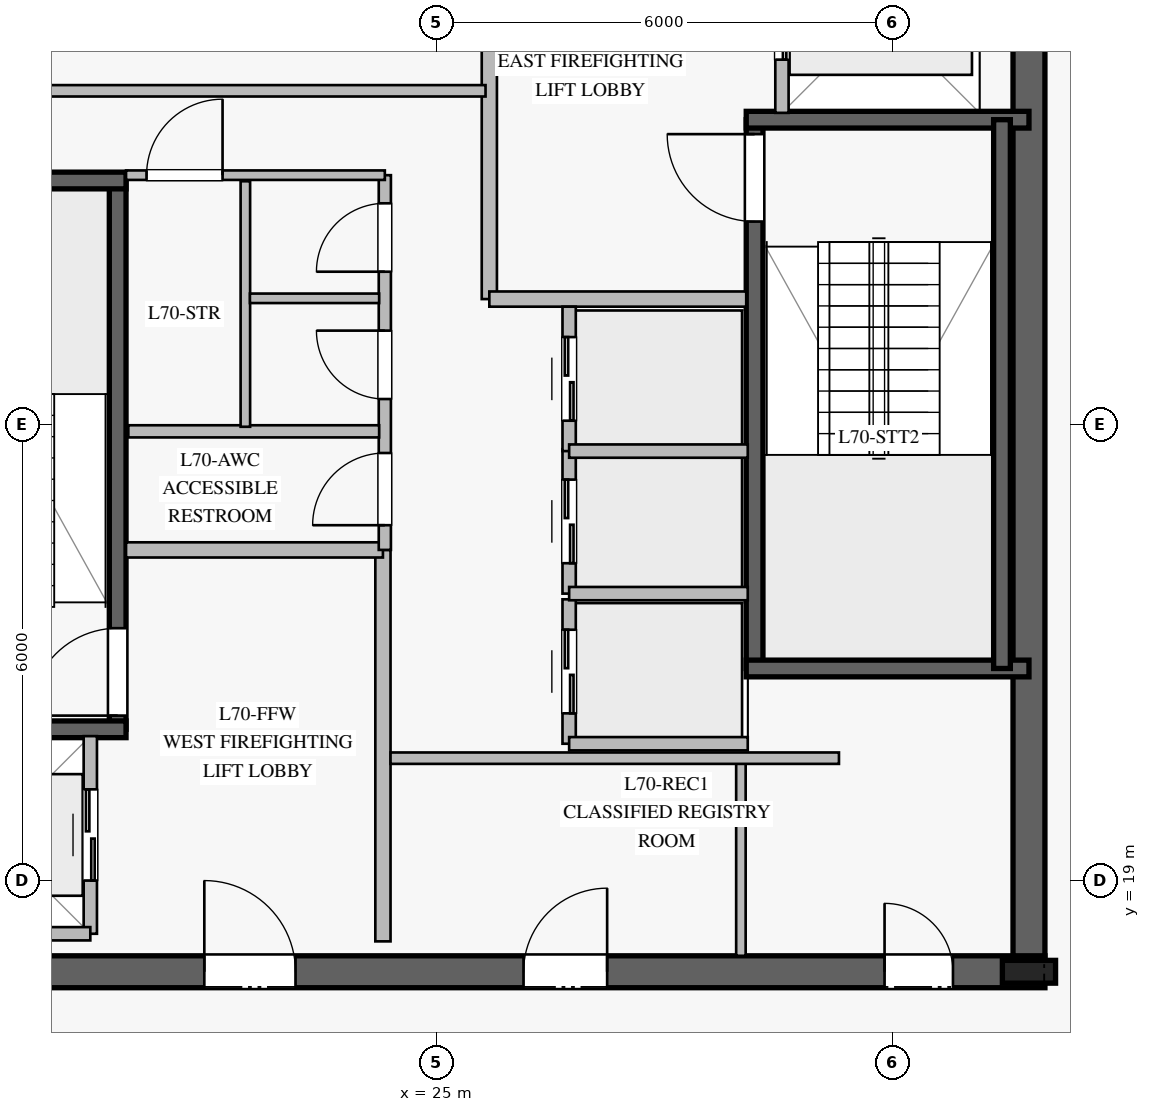
"""IFC4 building model, lengths in metres.
Left out: names, types, materials, properties, quantities, classifications, styles, units other than length and angle.
Written with IfcOpenShell. Run it as: python <this file> out.ifc"""

import sys

from ifc_helpers import new_model, si_unit, direction, frame, frame_2d, origin, origin_2d, place, context, subcontext, project, spatial, rectangle, i_section, extrude, element, fill, save


model = new_model("IFC4")
c1 = context("Model", 3, precision=1e-05, world=origin(), true_north=direction((0.0, 1.0)))
c2 = subcontext(c1, "Body", "Model", "MODEL_VIEW")
j1 = project(units=[si_unit("LENGTHUNIT", "METRE"), si_unit("PLANEANGLEUNIT", "RADIAN")], contexts=[c1])
p1 = place(None, origin())
s1 = spatial("IfcSite", under=j1, at=p1, CompositionType="ELEMENT")
p2 = place(p1, origin())
s2 = spatial("IfcBuilding", under=s1, at=p2, CompositionType="ELEMENT")
p3 = place(p2, frame((0.0, 0.0, 290.2)))
s3 = spatial("IfcBuildingStorey", under=s2, at=p3, CompositionType="ELEMENT", Elevation=290.2)
p4 = place(p3, frame((16.99, 17.8, 0.0), z_axis=(0.0, 0.0, 1.0), x_axis=(1.0, 0.0, 0.0)))
e1 = element("IfcWall", 1, at=p4, inside=s3, PredefinedType="SHEAR", context=c2, shape_type="SweptSolid", body=[
    extrude(rectangle(XDim=16.02, YDim=0.42, at=frame_2d((8.01, 0.0))), origin(), (0.0, 0.0, 1.0), 3.78),
])
p5 = place(p4, frame((4.96, 0.0, 0.0)))
e2 = element("IfcOpeningElement", 2, at=p5, cuts=e1, PredefinedType="OPENING", context=c2, shape_type="SweptSolid", body=[
    extrude(rectangle(XDim=1.2, YDim=2.25, at=frame_2d((0.6, 1.125))), frame((0.0, 0.22, 0.0), z_axis=(0.0, -1.0, 0.0), x_axis=(1.0, 0.0, 0.0)), (0.0, 0.0, 1.0), 0.44),
])
p6 = place(p4, frame((13.91, 0.0, 0.0)))
e3 = element("IfcOpeningElement", 3, at=p6, cuts=e1, PredefinedType="OPENING", context=c2, shape_type="SweptSolid", body=[
    extrude(rectangle(XDim=0.9, YDim=2.1, at=frame_2d((0.45, 1.05))), frame((0.0, 0.22, 0.0), z_axis=(0.0, -1.0, 0.0), x_axis=(1.0, 0.0, 0.0)), (0.0, 0.0, 1.0), 0.44),
])
p7 = place(p4, frame((9.16, 0.0, 0.0)))
e4 = element("IfcOpeningElement", 4, at=p7, cuts=e1, PredefinedType="OPENING", context=c2, shape_type="SweptSolid", body=[
    extrude(rectangle(XDim=1.1, YDim=2.2, at=frame_2d((0.55, 1.1))), frame((0.0, 0.22, 0.0), z_axis=(0.0, -1.0, 0.0), x_axis=(1.0, 0.0, 0.0)), (0.0, 0.0, 1.0), 0.44),
])
p8 = place(p3, frame((32.8, 18.01, 0.0), z_axis=(0.0, 0.0, 1.0), x_axis=(0.0, 1.0, 0.0)))
e5 = element("IfcWall", 5, at=p8, inside=s3, PredefinedType="SHEAR", context=c2, shape_type="SweptSolid", body=[
    extrude(rectangle(XDim=13.98, YDim=0.42, at=frame_2d((6.99, 0.0))), origin(), (0.0, 0.0, 1.0), 3.78),
])
p9 = place(p3, frame((32.8, 17.8, 0.0), z_axis=(0.0, 0.0, 1.0), x_axis=(1.0, 0.0, 0.0)))
e6 = element("IfcColumn", 6, at=p9, inside=s3, PredefinedType="COLUMN", context=c2, shape_type="SweptSolid", body=[
    extrude(i_section(OverallWidth=0.3, OverallDepth=0.7, WebThickness=0.017, FlangeThickness=0.032, at=origin_2d()), origin(), (0.0, 0.0, 1.0), 4.0),
])
p10 = place(p3, frame((20.81, 20.99, 0.0), z_axis=(0.0, 0.0, 1.0), x_axis=(0.0, 1.0, 0.0)))
e7 = element("IfcWall", 7, at=p10, inside=s3, PredefinedType="SOLIDWALL", context=c2, shape_type="SweptSolid", body=[
    extrude(rectangle(XDim=7.22, YDim=0.22, at=frame_2d((3.61, 0.0))), origin(), (0.0, 0.0, 1.0), 3.78),
])
p11 = place(p10, frame((0.18, 0.0, 0.0)))
e8 = element("IfcOpeningElement", 8, at=p11, cuts=e7, PredefinedType="OPENING", context=c2, shape_type="SweptSolid", body=[
    extrude(rectangle(XDim=1.15, YDim=2.2, at=frame_2d((0.575, 1.1))), frame((0.0, 0.12, 0.0), z_axis=(0.0, -1.0, 0.0), x_axis=(1.0, 0.0, 0.0)), (0.0, 0.0, 1.0), 0.24),
])
for number, where, z_axis, x_axis in (
    (9, (17.2, 20.99, 0.0), (0.0, 0.0, 1.0), (1.0, 0.0, 0.0)),
    (10, (17.2, 28.21, 0.0), (0.0, 0.0, 1.0), (1.0, 0.0, 0.0)),
):
    element("IfcWall", number, at=place(p3, frame(where, z_axis=z_axis, x_axis=x_axis)), inside=s3, PredefinedType="SOLIDWALL", context=c2, shape_type="SweptSolid", body=[
        extrude(rectangle(XDim=3.72, YDim=0.22, at=frame_2d((1.86, 0.0))), origin(), (0.0, 0.0, 1.0), 3.78),
    ])
p12 = place(p3, frame((29.19, 21.79, 0.0), z_axis=(0.0, 0.0, 1.0), x_axis=(0.0, 1.0, 0.0)))
e11 = element("IfcWall", 11, at=p12, inside=s3, PredefinedType="SOLIDWALL", context=c2, shape_type="SweptSolid", body=[
    extrude(rectangle(XDim=7.22, YDim=0.22, at=frame_2d((3.61, 0.0))), origin(), (0.0, 0.0, 1.0), 3.78),
])
p13 = place(p12, frame((5.88, 0.0, 0.0)))
e12 = element("IfcOpeningElement", 12, at=p13, cuts=e11, PredefinedType="OPENING", context=c2, shape_type="SweptSolid", body=[
    extrude(rectangle(XDim=1.15, YDim=2.2, at=frame_2d((0.575, 1.1))), frame((0.0, 0.12, 0.0), z_axis=(0.0, -1.0, 0.0), x_axis=(1.0, 0.0, 0.0)), (0.0, 0.0, 1.0), 0.24),
])
for number, where, z_axis, x_axis in (
    (13, (29.08, 21.79, 0.0), (0.0, 0.0, 1.0), (1.0, 0.0, 0.0)),
    (14, (29.08, 29.01, 0.0), (0.0, 0.0, 1.0), (1.0, 0.0, 0.0)),
):
    element("IfcWall", number, at=place(p3, frame(where, z_axis=z_axis, x_axis=x_axis)), inside=s3, PredefinedType="SOLIDWALL", context=c2, shape_type="SweptSolid", body=[
        extrude(rectangle(XDim=3.72, YDim=0.22, at=frame_2d((1.86, 0.0))), origin(), (0.0, 0.0, 1.0), 3.78),
    ])
p14 = place(p3, frame((32.445, 29.01, 0.0), z_axis=(0.0, 0.0, 1.0), x_axis=(0.0, -1.0, 0.0)))
e15 = element("IfcWall", 15, at=p14, inside=s3, PredefinedType="SOLIDWALL", context=c2, shape_type="SweptSolid", body=[
    extrude(rectangle(XDim=7.22, YDim=0.22, at=frame_2d((3.61, 0.0))), origin(), (0.0, 0.0, 1.0), 3.78),
])
p15 = place(p3, frame((24.3, 18.2, 0.0), z_axis=(0.0, 0.0, 1.0), x_axis=(0.0, 1.0, 0.0)))
e16 = element("IfcWall", 16, at=p15, inside=s3, PredefinedType="PARTITIONING", context=c2, shape_type="SweptSolid", body=[
    extrude(rectangle(XDim=5.15, YDim=0.2, at=frame_2d((2.575, 0.0))), origin(), (0.0, 0.0, 1.0), 3.78),
])
p16 = place(p3, frame((20.92, 23.35, 0.0), z_axis=(0.0, 0.0, 1.0), x_axis=(1.0, 0.0, 0.0)))
e17 = element("IfcWall", 17, at=p16, inside=s3, PredefinedType="PARTITIONING", context=c2, shape_type="SweptSolid", body=[
    extrude(rectangle(XDim=3.38, YDim=0.2, at=frame_2d((1.69, 0.0))), origin(), (0.0, 0.0, 1.0), 3.78),
])
p17 = place(p3, frame((25.7, 26.65, 0.0), z_axis=(0.0, 0.0, 1.0), x_axis=(0.0, 1.0, 0.0)))
e18 = element("IfcWall", 18, at=p17, inside=s3, PredefinedType="PARTITIONING", context=c2, shape_type="SweptSolid", body=[
    extrude(rectangle(XDim=5.15, YDim=0.2, at=frame_2d((2.575, 0.0))), origin(), (0.0, 0.0, 1.0), 3.78),
])
p18 = place(p3, frame((25.7, 26.65, 0.0), z_axis=(0.0, 0.0, 1.0), x_axis=(1.0, 0.0, 0.0)))
e19 = element("IfcWall", 19, at=p18, inside=s3, PredefinedType="PARTITIONING", context=c2, shape_type="SweptSolid", body=[
    extrude(rectangle(XDim=3.38, YDim=0.2, at=frame_2d((1.69, 0.0))), origin(), (0.0, 0.0, 1.0), 3.78),
])
p19 = place(p3, frame((24.325, 23.35, 0.0), z_axis=(0.0, 0.0, 1.0), x_axis=(0.0, 1.0, 0.0)))
e20 = element("IfcWall", 20, at=p19, inside=s3, PredefinedType="PLUMBINGWALL", context=c2, shape_type="SweptSolid", body=[
    extrude(rectangle(XDim=4.93, YDim=0.16, at=frame_2d((2.465, 0.0))), origin(), (0.0, 0.0, 1.0), 3.78),
])
p20 = place(p19, frame((0.325, 0.0, 0.0)))
e21 = element("IfcOpeningElement", 21, at=p20, cuts=e20, PredefinedType="OPENING", context=c2, shape_type="SweptSolid", body=[
    extrude(rectangle(XDim=0.95, YDim=2.1, at=frame_2d((0.475, 1.05))), frame((0.0, 0.09, 0.0), z_axis=(0.0, -1.0, 0.0), x_axis=(1.0, 0.0, 0.0)), (0.0, 0.0, 1.0), 0.18),
])
p21 = place(p19, frame((1.985, 0.0, 0.0)))
e22 = element("IfcOpeningElement", 22, at=p21, cuts=e20, PredefinedType="OPENING", context=c2, shape_type="SweptSolid", body=[
    extrude(rectangle(XDim=0.9, YDim=2.1, at=frame_2d((0.45, 1.05))), frame((0.0, 0.09, 0.0), z_axis=(0.0, -1.0, 0.0), x_axis=(1.0, 0.0, 0.0)), (0.0, 0.0, 1.0), 0.18),
])
p22 = place(p19, frame((3.66, 0.0, 0.0)))
e23 = element("IfcOpeningElement", 23, at=p22, cuts=e20, PredefinedType="OPENING", context=c2, shape_type="SweptSolid", body=[
    extrude(rectangle(XDim=0.9, YDim=2.1, at=frame_2d((0.45, 1.05))), frame((0.0, 0.09, 0.0), z_axis=(0.0, -1.0, 0.0), x_axis=(1.0, 0.0, 0.0)), (0.0, 0.0, 1.0), 0.18),
])
p23 = place(p3, frame((20.92, 28.28, 0.0), z_axis=(0.0, 0.0, 1.0), x_axis=(1.0, 0.0, 0.0)))
e24 = element("IfcWall", 24, at=p23, inside=s3, PredefinedType="PARTITIONING", context=c2, shape_type="SweptSolid", body=[
    extrude(rectangle(XDim=3.405, YDim=0.125, at=frame_2d((1.703, 0.0))), origin(), (0.0, 0.0, 1.0), 3.78),
])
p24 = place(p23, frame((0.27, 0.0, 0.0)))
e25 = element("IfcOpeningElement", 25, at=p24, cuts=e24, PredefinedType="OPENING", context=c2, shape_type="SweptSolid", body=[
    extrude(rectangle(XDim=1.0, YDim=2.15, at=frame_2d((0.5, 1.075))), frame((0.0, 0.073, 0.0), z_axis=(0.0, -1.0, 0.0), x_axis=(1.0, 0.0, 0.0)), (0.0, 0.0, 1.0), 0.145),
])
p25 = place(p3, frame((29.01, 18.01, 0.0), z_axis=(0.0, 0.0, 1.0), x_axis=(0.0, 1.0, 0.0)))
e26 = element("IfcWall", 26, at=p25, inside=s3, PredefinedType="PARTITIONING", context=c2, shape_type="SweptSolid", body=[
    extrude(rectangle(XDim=2.54, YDim=0.125, at=frame_2d((1.27, 0.0))), origin(), (0.0, 0.0, 1.0), 3.78),
])
p26 = place(p3, frame((20.95, 24.91, 0.0), z_axis=(0.0, 0.0, 1.0), x_axis=(1.0, 0.0, 0.0)))
e27 = element("IfcWall", 27, at=p26, inside=s3, PredefinedType="PLUMBINGWALL", context=c2, shape_type="SweptSolid", body=[
    extrude(rectangle(XDim=3.3, YDim=0.16, at=frame_2d((1.65, 0.0))), origin(), (0.0, 0.0, 1.0), 3.78),
])
p27 = place(p3, frame((22.49, 24.97, 0.0), z_axis=(0.0, 0.0, 1.0), x_axis=(0.0, 1.0, 0.0)))
e28 = element("IfcWall", 28, at=p27, inside=s3, PredefinedType="PARTITIONING", context=c2, shape_type="SweptSolid", body=[
    extrude(rectangle(XDim=3.23, YDim=0.125, at=frame_2d((1.615, 0.0))), origin(), (0.0, 0.0, 1.0), 3.78),
])
p28 = place(p3, frame((22.55, 26.66, 0.0), z_axis=(0.0, 0.0, 1.0), x_axis=(1.0, 0.0, 0.0)))
e29 = element("IfcWall", 29, at=p28, inside=s3, PredefinedType="PARTITIONING", context=c2, shape_type="SweptSolid", body=[
    extrude(rectangle(XDim=1.7, YDim=0.125, at=frame_2d((0.85, 0.0))), origin(), (0.0, 0.0, 1.0), 3.78),
])
p29 = place(p3, frame((24.4, 20.61, 0.0), z_axis=(0.0, 0.0, 1.0), x_axis=(1.0, 0.0, 0.0)))
e30 = element("IfcWall", 30, at=p29, inside=s3, PredefinedType="PARTITIONING", context=c2, shape_type="SweptSolid", body=[
    extrude(rectangle(XDim=5.9, YDim=0.15, at=frame_2d((2.95, 0.0))), origin(), (0.0, 0.0, 1.0), 3.78),
])
p30 = place(p3, frame((19.75, 29.39, 0.0), z_axis=(0.0, 0.0, 1.0), x_axis=(1.0, 0.0, 0.0)))
e31 = element("IfcWall", 31, at=p30, inside=s3, PredefinedType="PARTITIONING", context=c2, shape_type="SweptSolid", body=[
    extrude(rectangle(XDim=5.9, YDim=0.15, at=frame_2d((2.95, 0.0))), origin(), (0.0, 0.0, 1.0), 3.78),
])
p31 = place(p3, frame((26.75, 20.8, 0.0), z_axis=(0.0, 0.0, 1.0), x_axis=(0.0, 1.0, 0.0)))
e32 = element("IfcWall", 32, at=p31, inside=s3, PredefinedType="PARTITIONING", context=c2, shape_type="SweptSolid", body=[
    extrude(rectangle(XDim=1.9, YDim=0.175, at=frame_2d((0.95, 0.0))), origin(), (0.0, 0.0, 1.0), 3.78),
])
p32 = place(p31, frame((0.4, 0.0, 0.0)))
e33 = element("IfcOpeningElement", 33, at=p32, cuts=e32, PredefinedType="OPENING", context=c2, shape_type="SweptSolid", body=[
    extrude(rectangle(XDim=1.1, YDim=2.2, at=frame_2d((0.55, 1.1))), frame((0.0, 0.098, 0.0), z_axis=(0.0, -1.0, 0.0), x_axis=(1.0, 0.0, 0.0)), (0.0, 0.0, 1.0), 0.195),
])
p33 = place(p3, frame((26.75, 20.8, 0.0), z_axis=(0.0, 0.0, 1.0), x_axis=(1.0, 0.0, 0.0)))
e34 = element("IfcWall", 34, at=p33, inside=s3, PredefinedType="PARTITIONING", context=c2, shape_type="SweptSolid", body=[
    extrude(rectangle(XDim=2.35, YDim=0.175, at=frame_2d((1.175, 0.0))), origin(), (0.0, 0.0, 1.0), 3.78),
])
p34 = place(p3, frame((26.75, 22.775, 0.0), z_axis=(0.0, 0.0, 1.0), x_axis=(0.0, 1.0, 0.0)))
e35 = element("IfcWall", 35, at=p34, inside=s3, PredefinedType="PARTITIONING", context=c2, shape_type="SweptSolid", body=[
    extrude(rectangle(XDim=1.9, YDim=0.175, at=frame_2d((0.95, 0.0))), origin(), (0.0, 0.0, 1.0), 3.78),
])
p35 = place(p34, frame((0.4, 0.0, 0.0)))
e36 = element("IfcOpeningElement", 36, at=p35, cuts=e35, PredefinedType="OPENING", context=c2, shape_type="SweptSolid", body=[
    extrude(rectangle(XDim=1.1, YDim=2.2, at=frame_2d((0.55, 1.1))), frame((0.0, 0.098, 0.0), z_axis=(0.0, -1.0, 0.0), x_axis=(1.0, 0.0, 0.0)), (0.0, 0.0, 1.0), 0.195),
])
p36 = place(p3, frame((26.75, 22.775, 0.0), z_axis=(0.0, 0.0, 1.0), x_axis=(1.0, 0.0, 0.0)))
e37 = element("IfcWall", 37, at=p36, inside=s3, PredefinedType="PARTITIONING", context=c2, shape_type="SweptSolid", body=[
    extrude(rectangle(XDim=2.35, YDim=0.175, at=frame_2d((1.175, 0.0))), origin(), (0.0, 0.0, 1.0), 3.78),
])
p37 = place(p3, frame((26.75, 24.65, 0.0), z_axis=(0.0, 0.0, 1.0), x_axis=(0.0, 1.0, 0.0)))
e38 = element("IfcWall", 38, at=p37, inside=s3, PredefinedType="PARTITIONING", context=c2, shape_type="SweptSolid", body=[
    extrude(rectangle(XDim=1.9, YDim=0.175, at=frame_2d((0.95, 0.0))), origin(), (0.0, 0.0, 1.0), 3.78),
])
p38 = place(p37, frame((0.4, 0.0, 0.0)))
e39 = element("IfcOpeningElement", 39, at=p38, cuts=e38, PredefinedType="OPENING", context=c2, shape_type="SweptSolid", body=[
    extrude(rectangle(XDim=1.1, YDim=2.2, at=frame_2d((0.55, 1.1))), frame((0.0, 0.098, 0.0), z_axis=(0.0, -1.0, 0.0), x_axis=(1.0, 0.0, 0.0)), (0.0, 0.0, 1.0), 0.195),
])
p39 = place(p3, frame((26.75, 24.65, 0.0), z_axis=(0.0, 0.0, 1.0), x_axis=(1.0, 0.0, 0.0)))
e40 = element("IfcWall", 40, at=p39, inside=s3, PredefinedType="PARTITIONING", context=c2, shape_type="SweptSolid", body=[
    extrude(rectangle(XDim=2.35, YDim=0.175, at=frame_2d((1.175, 0.0))), origin(), (0.0, 0.0, 1.0), 3.78),
])
p40 = place(p3, frame((20.45, 18.3, 0.0), z_axis=(0.0, 0.0, 1.0), x_axis=(0.0, 1.0, 0.0)))
e41 = element("IfcWall", 41, at=p40, inside=s3, PredefinedType="PARTITIONING", context=c2, shape_type="SweptSolid", body=[
    extrude(rectangle(XDim=2.6, YDim=0.175, at=frame_2d((1.3, 0.0))), origin(), (0.0, 0.0, 1.0), 3.78),
])
p41 = place(p40, frame((0.7, 0.0, 0.0)))
e42 = element("IfcOpeningElement", 42, at=p41, cuts=e41, PredefinedType="OPENING", context=c2, shape_type="SweptSolid", body=[
    extrude(rectangle(XDim=1.2, YDim=2.2, at=frame_2d((0.6, 1.1))), frame((0.0, 0.098, 0.0), z_axis=(0.0, -1.0, 0.0), x_axis=(1.0, 0.0, 0.0)), (0.0, 0.0, 1.0), 0.195),
])
p42 = place(p3, frame((17.85, 18.3, 0.0), z_axis=(0.0, 0.0, 1.0), x_axis=(1.0, 0.0, 0.0)))
e43 = element("IfcWall", 43, at=p42, inside=s3, PredefinedType="PARTITIONING", context=c2, shape_type="SweptSolid", body=[
    extrude(rectangle(XDim=2.6, YDim=0.175, at=frame_2d((1.3, 0.0))), origin(), (0.0, 0.0, 1.0), 3.78),
])
p43 = place(p3, frame((29.55, 29.1, 0.0), z_axis=(0.0, 0.0, 1.0), x_axis=(0.0, 1.0, 0.0)))
e44 = element("IfcWall", 44, at=p43, inside=s3, PredefinedType="PARTITIONING", context=c2, shape_type="SweptSolid", body=[
    extrude(rectangle(XDim=2.6, YDim=0.175, at=frame_2d((1.3, 0.0))), origin(), (0.0, 0.0, 1.0), 3.78),
])
p44 = place(p43, frame((0.7, 0.0, 0.0)))
e45 = element("IfcOpeningElement", 45, at=p44, cuts=e44, PredefinedType="OPENING", context=c2, shape_type="SweptSolid", body=[
    extrude(rectangle(XDim=1.2, YDim=2.2, at=frame_2d((0.6, 1.1))), frame((0.0, 0.098, 0.0), z_axis=(0.0, -1.0, 0.0), x_axis=(1.0, 0.0, 0.0)), (0.0, 0.0, 1.0), 0.195),
])
p45 = place(p11, origin())
e46 = element("IfcDoor", 46, at=p45, inside=s3, OperationType="SINGLE_SWING_LEFT", PredefinedType="DOOR", context=c2, shape_type="SweptSolid", body=[
    extrude(rectangle(XDim=1.15, YDim=2.2, at=frame_2d((0.575, 1.1))), frame((0.0, 0.025, 0.0), z_axis=(0.0, -1.0, 0.0), x_axis=(1.0, 0.0, 0.0)), (0.0, 0.0, 1.0), 0.05),
])
fill(e8, e46)
p46 = place(p13, origin())
e47 = element("IfcDoor", 47, at=p46, inside=s3, OperationType="SINGLE_SWING_RIGHT", PredefinedType="DOOR", context=c2, shape_type="SweptSolid", body=[
    extrude(rectangle(XDim=1.15, YDim=2.2, at=frame_2d((0.575, 1.1))), frame((0.0, 0.025, 0.0), z_axis=(0.0, -1.0, 0.0), x_axis=(1.0, 0.0, 0.0)), (0.0, 0.0, 1.0), 0.05),
])
fill(e12, e47)
p47 = place(p5, origin())
e48 = element("IfcDoor", 48, at=p47, inside=s3, OperationType="SINGLE_SWING_LEFT", PredefinedType="DOOR", context=c2, shape_type="SweptSolid", body=[
    extrude(rectangle(XDim=1.2, YDim=2.25, at=frame_2d((0.6, 1.125))), frame((0.0, 0.025, 0.0), z_axis=(0.0, -1.0, 0.0), x_axis=(1.0, 0.0, 0.0)), (0.0, 0.0, 1.0), 0.05),
])
fill(e2, e48)
p48 = place(p20, origin())
e49 = element("IfcDoor", 49, at=p48, inside=s3, OperationType="SINGLE_SWING_LEFT", PredefinedType="DOOR", context=c2, shape_type="SweptSolid", body=[
    extrude(rectangle(XDim=0.95, YDim=2.1, at=frame_2d((0.475, 1.05))), frame((0.0, 0.025, 0.0), z_axis=(0.0, -1.0, 0.0), x_axis=(1.0, 0.0, 0.0)), (0.0, 0.0, 1.0), 0.05),
])
fill(e21, e49)
p49 = place(p21, origin())
e50 = element("IfcDoor", 50, at=p49, inside=s3, OperationType="SINGLE_SWING_RIGHT", PredefinedType="DOOR", context=c2, shape_type="SweptSolid", body=[
    extrude(rectangle(XDim=0.9, YDim=2.1, at=frame_2d((0.45, 1.05))), frame((0.0, 0.025, 0.0), z_axis=(0.0, -1.0, 0.0), x_axis=(1.0, 0.0, 0.0)), (0.0, 0.0, 1.0), 0.05),
])
fill(e22, e50)
p50 = place(p22, origin())
e51 = element("IfcDoor", 51, at=p50, inside=s3, OperationType="SINGLE_SWING_LEFT", PredefinedType="DOOR", context=c2, shape_type="SweptSolid", body=[
    extrude(rectangle(XDim=0.9, YDim=2.1, at=frame_2d((0.45, 1.05))), frame((0.0, 0.025, 0.0), z_axis=(0.0, -1.0, 0.0), x_axis=(1.0, 0.0, 0.0)), (0.0, 0.0, 1.0), 0.05),
])
fill(e23, e51)
p51 = place(p24, origin())
e52 = element("IfcDoor", 52, at=p51, inside=s3, OperationType="SINGLE_SWING_RIGHT", PredefinedType="DOOR", context=c2, shape_type="SweptSolid", body=[
    extrude(rectangle(XDim=1.0, YDim=2.15, at=frame_2d((0.5, 1.075))), frame((0.0, 0.025, 0.0), z_axis=(0.0, -1.0, 0.0), x_axis=(1.0, 0.0, 0.0)), (0.0, 0.0, 1.0), 0.05),
])
fill(e25, e52)
p52 = place(p6, origin())
e53 = element("IfcDoor", 53, at=p52, inside=s3, OperationType="SINGLE_SWING_LEFT", PredefinedType="DOOR", context=c2, shape_type="SweptSolid", body=[
    extrude(rectangle(XDim=0.9, YDim=2.1, at=frame_2d((0.45, 1.05))), frame((0.0, 0.025, 0.0), z_axis=(0.0, -1.0, 0.0), x_axis=(1.0, 0.0, 0.0)), (0.0, 0.0, 1.0), 0.05),
])
fill(e3, e53)
p53 = place(p7, origin())
e54 = element("IfcDoor", 54, at=p53, inside=s3, OperationType="SINGLE_SWING_RIGHT", PredefinedType="DOOR", context=c2, shape_type="SweptSolid", body=[
    extrude(rectangle(XDim=1.1, YDim=2.2, at=frame_2d((0.55, 1.1))), frame((0.0, 0.025, 0.0), z_axis=(0.0, -1.0, 0.0), x_axis=(1.0, 0.0, 0.0)), (0.0, 0.0, 1.0), 0.05),
])
fill(e4, e54)
p54 = place(p32, origin())
e55 = element("IfcDoor", 55, at=p54, inside=s3, OperationType="DOUBLE_DOOR_SLIDING", PredefinedType="DOOR", context=c2, shape_type="SweptSolid", body=[
    extrude(rectangle(XDim=1.1, YDim=2.2, at=frame_2d((0.55, 1.1))), frame((0.0, 0.025, 0.0), z_axis=(0.0, -1.0, 0.0), x_axis=(1.0, 0.0, 0.0)), (0.0, 0.0, 1.0), 0.05),
])
fill(e33, e55)
p55 = place(p35, origin())
e56 = element("IfcDoor", 56, at=p55, inside=s3, OperationType="DOUBLE_DOOR_SLIDING", PredefinedType="DOOR", context=c2, shape_type="SweptSolid", body=[
    extrude(rectangle(XDim=1.1, YDim=2.2, at=frame_2d((0.55, 1.1))), frame((0.0, 0.025, 0.0), z_axis=(0.0, -1.0, 0.0), x_axis=(1.0, 0.0, 0.0)), (0.0, 0.0, 1.0), 0.05),
])
fill(e36, e56)
p56 = place(p38, origin())
e57 = element("IfcDoor", 57, at=p56, inside=s3, OperationType="DOUBLE_DOOR_SLIDING", PredefinedType="DOOR", context=c2, shape_type="SweptSolid", body=[
    extrude(rectangle(XDim=1.1, YDim=2.2, at=frame_2d((0.55, 1.1))), frame((0.0, 0.025, 0.0), z_axis=(0.0, -1.0, 0.0), x_axis=(1.0, 0.0, 0.0)), (0.0, 0.0, 1.0), 0.05),
])
fill(e39, e57)
p57 = place(p41, origin())
e58 = element("IfcDoor", 58, at=p57, inside=s3, OperationType="DOUBLE_DOOR_SLIDING", PredefinedType="DOOR", context=c2, shape_type="SweptSolid", body=[
    extrude(rectangle(XDim=1.2, YDim=2.2, at=frame_2d((0.6, 1.1))), frame((0.0, 0.025, 0.0), z_axis=(0.0, -1.0, 0.0), x_axis=(1.0, 0.0, 0.0)), (0.0, 0.0, 1.0), 0.05),
])
fill(e42, e58)
p58 = place(p44, origin())
e59 = element("IfcDoor", 59, at=p58, inside=s3, OperationType="DOUBLE_DOOR_SLIDING", PredefinedType="DOOR", context=c2, shape_type="SweptSolid", body=[
    extrude(rectangle(XDim=1.2, YDim=2.2, at=frame_2d((0.6, 1.1))), frame((0.0, 0.025, 0.0), z_axis=(0.0, -1.0, 0.0), x_axis=(1.0, 0.0, 0.0)), (0.0, 0.0, 1.0), 0.05),
])
fill(e45, e59)
save(model, sys.argv[1])
